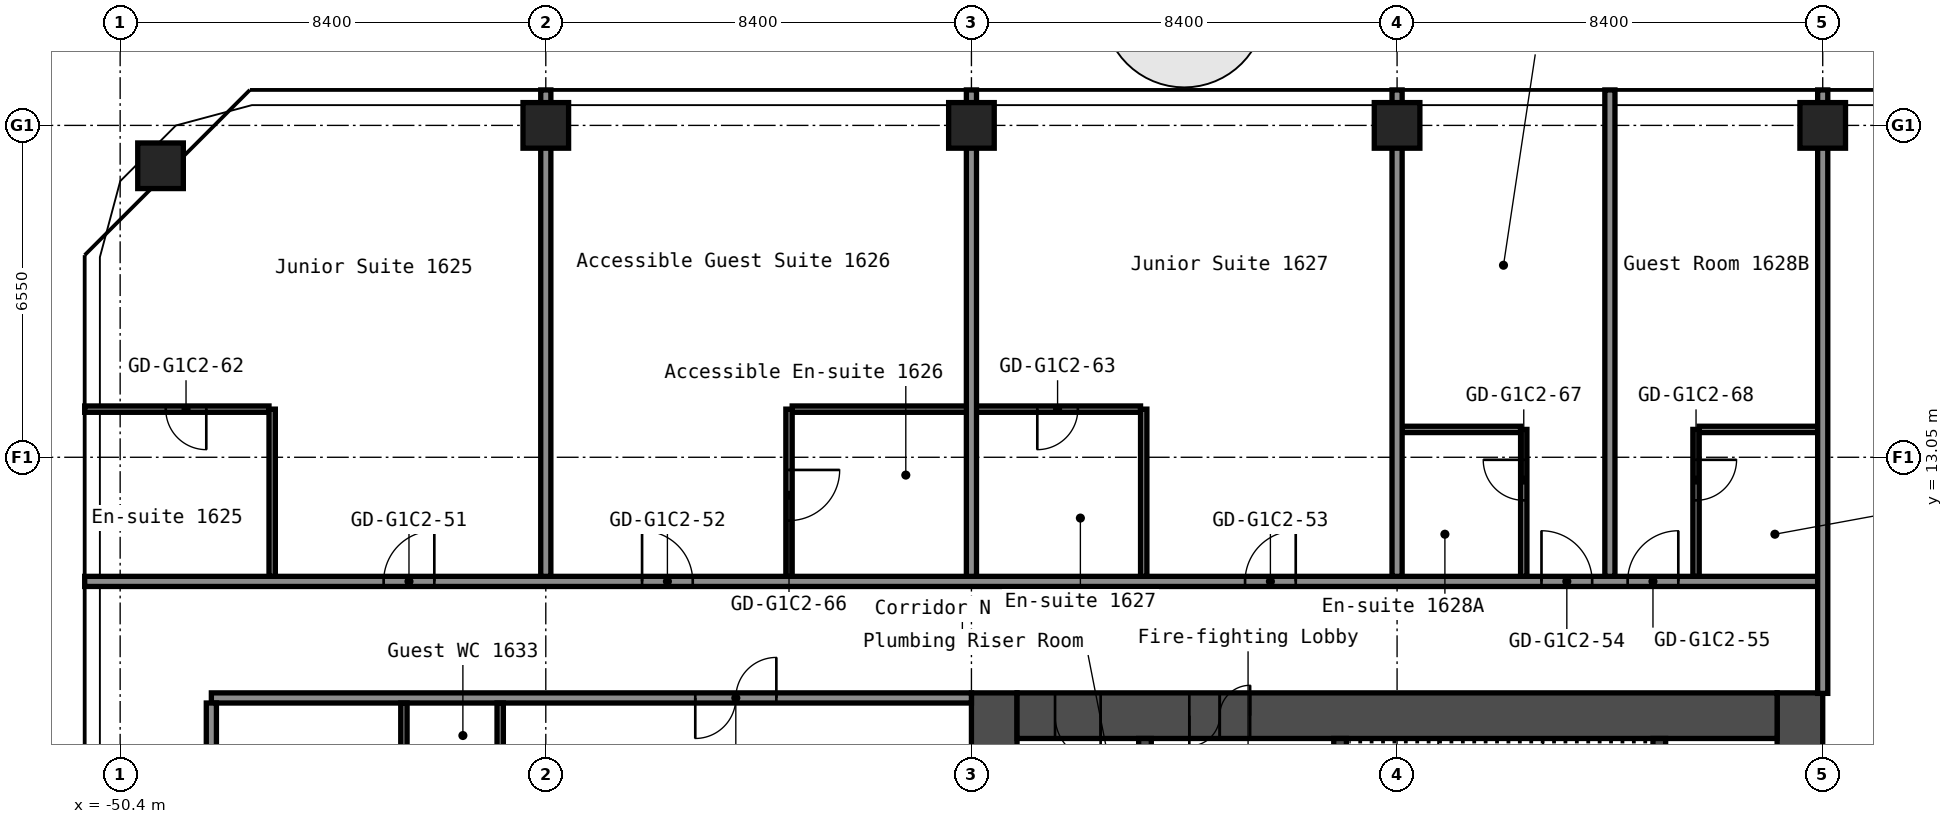
"""IFC4 building model, lengths in metres.
Left out: names, types, materials, properties, quantities, classifications, styles, units other than length and angle.
Written with IfcOpenShell. Run it as: python <this file> out.ifc"""

import sys

from ifc_helpers import new_model, si_unit, direction, frame, frame_2d, origin, origin_2d, place, context, subcontext, project, spatial, rectangle, hollow_rectangle, extrude, element, fill, save


model = new_model("IFC4")
c1 = context("Model", 3, precision=1e-05, world=origin(), true_north=direction((0.0, 1.0)))
c2 = subcontext(c1, "Body", "Model", "MODEL_VIEW")
j1 = project(units=[si_unit("LENGTHUNIT", "METRE"), si_unit("PLANEANGLEUNIT", "RADIAN")], contexts=[c1])
p1 = place(None, origin())
s1 = spatial("IfcSite", under=j1, at=p1, CompositionType="ELEMENT")
p2 = place(p1, origin())
s2 = spatial("IfcBuilding", under=s1, at=p2, CompositionType="ELEMENT")
p3 = place(p2, frame((0.0, 0.0, 58.2)))
s3 = spatial("IfcBuildingStorey", under=s2, at=p3, CompositionType="ELEMENT", Elevation=58.2)
for number, where, z_axis, x_axis in (
    (1, (-49.603, 18.803, 0.0), (0.0, 0.0, 1.0), (1.0, 0.0, 0.0)),
    (2, (-42.0, 19.6, 0.0), (0.0, 0.0, 1.0), (1.0, 0.0, 0.0)),
    (3, (-33.6, 19.6, 0.0), (0.0, 0.0, 1.0), (1.0, 0.0, 0.0)),
    (4, (-25.2, 19.6, 0.0), (0.0, 0.0, 1.0), (1.0, 0.0, 0.0)),
    (5, (-16.8, 19.6, 0.0), (0.0, 0.0, 1.0), (1.0, 0.0, 0.0)),
):
    element("IfcColumn", number, at=place(p3, frame(where, z_axis=z_axis, x_axis=x_axis)), inside=s3, PredefinedType="COLUMN", context=c2, shape_type="SweptSolid", body=[
        extrude(hollow_rectangle(XDim=0.9, YDim=0.9, WallThickness=0.036, at=origin_2d()), origin(), (0.0, 0.0, 1.0), 2.8),
    ])
p4 = place(p3, frame((-17.25, -8.4, 0.0), z_axis=(0.0, 0.0, 1.0), x_axis=(0.0, 1.0, 0.0)))
e6 = element("IfcWall", 6, at=p4, inside=s3, PredefinedType="SHEAR", context=c2, shape_type="SweptSolid", body=[
    extrude(rectangle(XDim=16.8, YDim=0.9, at=frame_2d((8.4, 0.0))), origin(), (0.0, 0.0, 1.0), 2.8),
])
p5 = place(p4, frame((12.75, 0.0, 0.0)))
e7 = element("IfcOpeningElement", 7, at=p5, cuts=e6, PredefinedType="OPENING", context=c2, shape_type="SweptSolid", body=[
    extrude(rectangle(XDim=1.2, YDim=2.1, at=frame_2d((0.6, 1.05))), frame((0.0, 0.46, 0.0), z_axis=(0.0, -1.0, 0.0), x_axis=(1.0, 0.0, 0.0)), (0.0, 0.0, 1.0), 0.92),
])
p6 = place(p4, frame((2.85, 0.0, 0.0)))
e8 = element("IfcOpeningElement", 8, at=p6, cuts=e6, PredefinedType="OPENING", context=c2, shape_type="SweptSolid", body=[
    extrude(rectangle(XDim=1.2, YDim=2.1, at=frame_2d((0.6, 1.05))), frame((0.0, 0.46, 0.0), z_axis=(0.0, -1.0, 0.0), x_axis=(1.0, 0.0, 0.0)), (0.0, 0.0, 1.0), 0.92),
])
p7 = place(p3, frame((-33.15, -8.4, 0.0), z_axis=(0.0, 0.0, 1.0), x_axis=(0.0, 1.0, 0.0)))
e9 = element("IfcWall", 9, at=p7, inside=s3, PredefinedType="SHEAR", context=c2, shape_type="SweptSolid", body=[
    extrude(rectangle(XDim=16.8, YDim=0.9, at=frame_2d((8.4, 0.0))), origin(), (0.0, 0.0, 1.0), 2.8),
])
p8 = place(p3, frame((-32.7, 7.95, 0.0), z_axis=(0.0, 0.0, 1.0), x_axis=(1.0, 0.0, 0.0)))
e10 = element("IfcWall", 10, at=p8, inside=s3, PredefinedType="SHEAR", context=c2, shape_type="SweptSolid", body=[
    extrude(rectangle(XDim=15.0, YDim=0.9, at=frame_2d((7.5, 0.0))), origin(), (0.0, 0.0, 1.0), 2.8),
])
p9 = place(p8, frame((3.4, 0.0, 0.0)))
e11 = element("IfcOpeningElement", 11, at=p9, cuts=e10, PredefinedType="OPENING", context=c2, shape_type="SweptSolid", body=[
    extrude(rectangle(XDim=1.2, YDim=2.1, at=frame_2d((0.6, 1.05))), frame((0.0, 0.46, 0.0), z_axis=(0.0, -1.0, 0.0), x_axis=(1.0, 0.0, 0.0)), (0.0, 0.0, 1.0), 0.92),
])
p10 = place(p8, frame((0.75, 0.0, 0.0)))
e12 = element("IfcOpeningElement", 12, at=p10, cuts=e10, PredefinedType="OPENING", context=c2, shape_type="SweptSolid", body=[
    extrude(rectangle(XDim=0.9, YDim=2.1, at=frame_2d((0.45, 1.05))), frame((0.0, 0.46, 0.0), z_axis=(0.0, -1.0, 0.0), x_axis=(1.0, 0.0, 0.0)), (0.0, 0.0, 1.0), 0.92),
])
p11 = place(p3, frame((-20.025, 1.2, 0.0), z_axis=(0.0, 0.0, 1.0), x_axis=(0.0, 1.0, 0.0)))
e13 = element("IfcWall", 13, at=p11, inside=s3, PredefinedType="SHEAR", context=c2, shape_type="SweptSolid", body=[
    extrude(rectangle(XDim=6.3, YDim=0.25, at=frame_2d((3.15, 0.0))), origin(), (0.0, 0.0, 1.0), 2.8),
])
p12 = place(p3, frame((-26.325, 3.75, 0.0), z_axis=(0.0, 0.0, 1.0), x_axis=(0.0, 1.0, 0.0)))
e14 = element("IfcWall", 14, at=p12, inside=s3, PredefinedType="SHEAR", context=c2, shape_type="SweptSolid", body=[
    extrude(rectangle(XDim=3.75, YDim=0.25, at=frame_2d((1.875, 0.0))), origin(), (0.0, 0.0, 1.0), 2.8),
])
p13 = place(p12, frame((1.25, 0.0, 0.0)))
e15 = element("IfcOpeningElement", 15, at=p13, cuts=e14, PredefinedType="OPENING", context=c2, shape_type="SweptSolid", body=[
    extrude(rectangle(XDim=1.2, YDim=2.1, at=frame_2d((0.6, 1.05))), frame((0.0, 0.135, 0.0), z_axis=(0.0, -1.0, 0.0), x_axis=(1.0, 0.0, 0.0)), (0.0, 0.0, 1.0), 0.27),
])
p14 = place(p3, frame((-30.175, 1.45, 0.0), z_axis=(0.0, 0.0, 1.0), x_axis=(0.0, 1.0, 0.0)))
e16 = element("IfcWall", 16, at=p14, inside=s3, PredefinedType="SHEAR", context=c2, shape_type="SweptSolid", body=[
    extrude(rectangle(XDim=6.05, YDim=0.25, at=frame_2d((3.025, 0.0))), origin(), (0.0, 0.0, 1.0), 2.8),
])
p15 = place(p14, frame((2.625, 0.0, 0.0)))
e17 = element("IfcOpeningElement", 17, at=p15, cuts=e16, PredefinedType="OPENING", context=c2, shape_type="SweptSolid", body=[
    extrude(rectangle(XDim=1.1, YDim=2.1, at=frame_2d((0.55, 1.05))), frame((0.0, 0.135, 0.0), z_axis=(0.0, -1.0, 0.0), x_axis=(1.0, 0.0, 0.0)), (0.0, 0.0, 1.0), 0.27),
])
p16 = place(p3, frame((-48.6, 8.3, 0.0), z_axis=(0.0, 0.0, 1.0), x_axis=(1.0, 0.0, 0.0)))
e18 = element("IfcWall", 18, at=p16, inside=s3, PredefinedType="PARTITIONING", context=c2, shape_type="SweptSolid", body=[
    extrude(rectangle(XDim=15.0, YDim=0.2, at=frame_2d((7.5, 0.0))), origin(), (0.0, 0.0, 1.0), 2.8),
])
p17 = place(p16, frame((9.55, 0.0, 0.0)))
e19 = element("IfcOpeningElement", 19, at=p17, cuts=e18, PredefinedType="OPENING", context=c2, shape_type="SweptSolid", body=[
    extrude(rectangle(XDim=1.6, YDim=2.1, at=frame_2d((0.8, 1.05))), frame((0.0, 0.11, 0.0), z_axis=(0.0, -1.0, 0.0), x_axis=(1.0, 0.0, 0.0)), (0.0, 0.0, 1.0), 0.22),
])
p18 = place(p3, frame((-51.1, 10.6, 0.0), z_axis=(0.0, 0.0, 1.0), x_axis=(1.0, 0.0, 0.0)))
e20 = element("IfcWall", 20, at=p18, inside=s3, PredefinedType="PARTITIONING", context=c2, shape_type="SweptSolid", body=[
    extrude(rectangle(XDim=34.3, YDim=0.2, at=frame_2d((17.15, 0.0))), origin(), (0.0, 0.0, 1.0), 2.8),
])
p19 = place(p18, frame((5.9, 0.0, 0.0)))
e21 = element("IfcOpeningElement", 21, at=p19, cuts=e20, PredefinedType="OPENING", context=c2, shape_type="SweptSolid", body=[
    extrude(rectangle(XDim=1.0, YDim=2.1, at=frame_2d((0.5, 1.05))), frame((0.0, 0.11, 0.0), z_axis=(0.0, -1.0, 0.0), x_axis=(1.0, 0.0, 0.0)), (0.0, 0.0, 1.0), 0.22),
])
p20 = place(p18, frame((11.0, 0.0, 0.0)))
e22 = element("IfcOpeningElement", 22, at=p20, cuts=e20, PredefinedType="OPENING", context=c2, shape_type="SweptSolid", body=[
    extrude(rectangle(XDim=1.0, YDim=2.1, at=frame_2d((0.5, 1.05))), frame((0.0, 0.11, 0.0), z_axis=(0.0, -1.0, 0.0), x_axis=(1.0, 0.0, 0.0)), (0.0, 0.0, 1.0), 0.22),
])
p21 = place(p18, frame((22.9, 0.0, 0.0)))
e23 = element("IfcOpeningElement", 23, at=p21, cuts=e20, PredefinedType="OPENING", context=c2, shape_type="SweptSolid", body=[
    extrude(rectangle(XDim=1.0, YDim=2.1, at=frame_2d((0.5, 1.05))), frame((0.0, 0.11, 0.0), z_axis=(0.0, -1.0, 0.0), x_axis=(1.0, 0.0, 0.0)), (0.0, 0.0, 1.0), 0.22),
])
p22 = place(p18, frame((28.75, 0.0, 0.0)))
e24 = element("IfcOpeningElement", 24, at=p22, cuts=e20, PredefinedType="OPENING", context=c2, shape_type="SweptSolid", body=[
    extrude(rectangle(XDim=1.0, YDim=2.1, at=frame_2d((0.5, 1.05))), frame((0.0, 0.11, 0.0), z_axis=(0.0, -1.0, 0.0), x_axis=(1.0, 0.0, 0.0)), (0.0, 0.0, 1.0), 0.22),
])
p23 = place(p18, frame((30.45, 0.0, 0.0)))
e25 = element("IfcOpeningElement", 25, at=p23, cuts=e20, PredefinedType="OPENING", context=c2, shape_type="SweptSolid", body=[
    extrude(rectangle(XDim=1.0, YDim=2.1, at=frame_2d((0.5, 1.05))), frame((0.0, 0.11, 0.0), z_axis=(0.0, -1.0, 0.0), x_axis=(1.0, 0.0, 0.0)), (0.0, 0.0, 1.0), 0.22),
])
for number, where, z_axis, x_axis in (
    (26, (-25.1, 13.6, 0.0), (0.0, 0.0, 1.0), (1.0, 0.0, 0.0)),
    (27, (-19.238, 13.6, 0.0), (0.0, 0.0, 1.0), (1.0, 0.0, 0.0)),
):
    element("IfcWall", number, at=place(p3, frame(where, z_axis=z_axis, x_axis=x_axis)), inside=s3, PredefinedType="PARTITIONING", context=c2, shape_type="SweptSolid", body=[
        extrude(rectangle(XDim=2.338, YDim=0.125, at=frame_2d((1.169, 0.0))), origin(), (0.0, 0.0, 1.0), 2.8),
    ])
p24 = place(p3, frame((-51.1, 14.0, 0.0), z_axis=(0.0, 0.0, 1.0), x_axis=(1.0, 0.0, 0.0)))
e28 = element("IfcWall", 28, at=p24, inside=s3, PredefinedType="PARTITIONING", context=c2, shape_type="SweptSolid", body=[
    extrude(rectangle(XDim=3.638, YDim=0.125, at=frame_2d((1.819, 0.0))), origin(), (0.0, 0.0, 1.0), 2.8),
])
p25 = place(p24, frame((1.6, 0.0, 0.0)))
e29 = element("IfcOpeningElement", 29, at=p25, cuts=e28, PredefinedType="OPENING", context=c2, shape_type="SweptSolid", body=[
    extrude(rectangle(XDim=0.8, YDim=2.1, at=frame_2d((0.4, 1.05))), frame((0.0, 0.073, 0.0), z_axis=(0.0, -1.0, 0.0), x_axis=(1.0, 0.0, 0.0)), (0.0, 0.0, 1.0), 0.145),
])
p26 = place(p3, frame((-37.137, 14.0, 0.0), z_axis=(0.0, 0.0, 1.0), x_axis=(1.0, 0.0, 0.0)))
e30 = element("IfcWall", 30, at=p26, inside=s3, PredefinedType="PARTITIONING", context=c2, shape_type="SweptSolid", body=[
    extrude(rectangle(XDim=6.875, YDim=0.125, at=frame_2d((3.438, 0.0))), origin(), (0.0, 0.0, 1.0), 2.8),
])
p27 = place(p26, frame((4.837, 0.0, 0.0)))
e31 = element("IfcOpeningElement", 31, at=p27, cuts=e30, PredefinedType="OPENING", context=c2, shape_type="SweptSolid", body=[
    extrude(rectangle(XDim=0.8, YDim=2.1, at=frame_2d((0.4, 1.05))), frame((0.0, 0.073, 0.0), z_axis=(0.0, -1.0, 0.0), x_axis=(1.0, 0.0, 0.0)), (0.0, 0.0, 1.0), 0.145),
])
p28 = place(p3, frame((-48.6, -8.2, 0.0), z_axis=(0.0, 0.0, 1.0), x_axis=(0.0, 1.0, 0.0)))
e32 = element("IfcWall", 32, at=p28, inside=s3, PredefinedType="PARTITIONING", context=c2, shape_type="SweptSolid", body=[
    extrude(rectangle(XDim=16.4, YDim=0.2, at=frame_2d((8.2, 0.0))), origin(), (0.0, 0.0, 1.0), 2.8),
])
for number, where, z_axis, x_axis in (
    (33, (-47.4, 10.7, 0.0), (0.0, 0.0, 1.0), (0.0, 1.0, 0.0)),
    (34, (-44.8, 4.9, 0.0), (0.0, 0.0, 1.0), (0.0, 1.0, 0.0)),
):
    element("IfcWall", number, at=place(p3, frame(where, z_axis=z_axis, x_axis=x_axis)), inside=s3, PredefinedType="PARTITIONING", context=c2, shape_type="SweptSolid", body=[
        extrude(rectangle(XDim=3.3, YDim=0.125, at=frame_2d((1.65, 0.0))), origin(), (0.0, 0.0, 1.0), 2.8),
    ])
p29 = place(p3, frame((-42.9, 5.9, 0.0), z_axis=(0.0, 0.0, 1.0), x_axis=(0.0, 1.0, 0.0)))
e35 = element("IfcWall", 35, at=p29, inside=s3, PredefinedType="PARTITIONING", context=c2, shape_type="SweptSolid", body=[
    extrude(rectangle(XDim=2.3, YDim=0.125, at=frame_2d((1.15, 0.0))), origin(), (0.0, 0.0, 1.0), 2.8),
])
p30 = place(p3, frame((-42.0, 10.7, 0.0), z_axis=(0.0, 0.0, 1.0), x_axis=(0.0, 1.0, 0.0)))
e36 = element("IfcWall", 36, at=p30, inside=s3, PredefinedType="PARTITIONING", context=c2, shape_type="SweptSolid", body=[
    extrude(rectangle(XDim=9.6, YDim=0.2, at=frame_2d((4.8, 0.0))), origin(), (0.0, 0.0, 1.0), 2.8),
])
p31 = place(p3, frame((-37.2, 10.7, 0.0), z_axis=(0.0, 0.0, 1.0), x_axis=(0.0, 1.0, 0.0)))
e37 = element("IfcWall", 37, at=p31, inside=s3, PredefinedType="PARTITIONING", context=c2, shape_type="SweptSolid", body=[
    extrude(rectangle(XDim=3.3, YDim=0.125, at=frame_2d((1.65, 0.0))), origin(), (0.0, 0.0, 1.0), 2.8),
])
p32 = place(p31, frame((1.1, 0.0, 0.0)))
e38 = element("IfcOpeningElement", 38, at=p32, cuts=e37, PredefinedType="OPENING", context=c2, shape_type="SweptSolid", body=[
    extrude(rectangle(XDim=1.0, YDim=2.1, at=frame_2d((0.5, 1.05))), frame((0.0, 0.073, 0.0), z_axis=(0.0, -1.0, 0.0), x_axis=(1.0, 0.0, 0.0)), (0.0, 0.0, 1.0), 0.145),
])
p33 = place(p3, frame((-33.6, 10.7, 0.0), z_axis=(0.0, 0.0, 1.0), x_axis=(0.0, 1.0, 0.0)))
e39 = element("IfcWall", 39, at=p33, inside=s3, PredefinedType="PARTITIONING", context=c2, shape_type="SweptSolid", body=[
    extrude(rectangle(XDim=9.6, YDim=0.2, at=frame_2d((4.8, 0.0))), origin(), (0.0, 0.0, 1.0), 2.8),
])
p34 = place(p3, frame((-30.2, 10.7, 0.0), z_axis=(0.0, 0.0, 1.0), x_axis=(0.0, 1.0, 0.0)))
e40 = element("IfcWall", 40, at=p34, inside=s3, PredefinedType="PARTITIONING", context=c2, shape_type="SweptSolid", body=[
    extrude(rectangle(XDim=3.3, YDim=0.125, at=frame_2d((1.65, 0.0))), origin(), (0.0, 0.0, 1.0), 2.8),
])
p35 = place(p3, frame((-25.2, 10.7, 0.0), z_axis=(0.0, 0.0, 1.0), x_axis=(0.0, 1.0, 0.0)))
e41 = element("IfcWall", 41, at=p35, inside=s3, PredefinedType="PARTITIONING", context=c2, shape_type="SweptSolid", body=[
    extrude(rectangle(XDim=9.6, YDim=0.2, at=frame_2d((4.8, 0.0))), origin(), (0.0, 0.0, 1.0), 2.8),
])
p36 = place(p3, frame((-22.7, 10.7, 0.0), z_axis=(0.0, 0.0, 1.0), x_axis=(0.0, 1.0, 0.0)))
e42 = element("IfcWall", 42, at=p36, inside=s3, PredefinedType="PARTITIONING", context=c2, shape_type="SweptSolid", body=[
    extrude(rectangle(XDim=2.9, YDim=0.125, at=frame_2d((1.45, 0.0))), origin(), (0.0, 0.0, 1.0), 2.8),
])
p37 = place(p36, frame((1.5, 0.0, 0.0)))
e43 = element("IfcOpeningElement", 43, at=p37, cuts=e42, PredefinedType="OPENING", context=c2, shape_type="SweptSolid", body=[
    extrude(rectangle(XDim=0.8, YDim=2.1, at=frame_2d((0.4, 1.05))), frame((0.0, 0.073, 0.0), z_axis=(0.0, -1.0, 0.0), x_axis=(1.0, 0.0, 0.0)), (0.0, 0.0, 1.0), 0.145),
])
p38 = place(p3, frame((-21.0, 10.7, 0.0), z_axis=(0.0, 0.0, 1.0), x_axis=(0.0, 1.0, 0.0)))
e44 = element("IfcWall", 44, at=p38, inside=s3, PredefinedType="PARTITIONING", context=c2, shape_type="SweptSolid", body=[
    extrude(rectangle(XDim=9.6, YDim=0.2, at=frame_2d((4.8, 0.0))), origin(), (0.0, 0.0, 1.0), 2.8),
])
p39 = place(p3, frame((-19.3, 10.7, 0.0), z_axis=(0.0, 0.0, 1.0), x_axis=(0.0, 1.0, 0.0)))
e45 = element("IfcWall", 45, at=p39, inside=s3, PredefinedType="PARTITIONING", context=c2, shape_type="SweptSolid", body=[
    extrude(rectangle(XDim=2.9, YDim=0.125, at=frame_2d((1.45, 0.0))), origin(), (0.0, 0.0, 1.0), 2.8),
])
p40 = place(p39, frame((1.5, 0.0, 0.0)))
e46 = element("IfcOpeningElement", 46, at=p40, cuts=e45, PredefinedType="OPENING", context=c2, shape_type="SweptSolid", body=[
    extrude(rectangle(XDim=0.8, YDim=2.1, at=frame_2d((0.4, 1.05))), frame((0.0, 0.073, 0.0), z_axis=(0.0, -1.0, 0.0), x_axis=(1.0, 0.0, 0.0)), (0.0, 0.0, 1.0), 0.145),
])
p41 = place(p3, frame((-16.8, 8.39, 0.0), z_axis=(0.0, 0.0, 1.0), x_axis=(0.0, 1.0, 0.0)))
e47 = element("IfcWall", 47, at=p41, inside=s3, PredefinedType="PARTITIONING", context=c2, shape_type="SweptSolid", body=[
    extrude(rectangle(XDim=11.91, YDim=0.2, at=frame_2d((5.955, 0.0))), origin(), (0.0, 0.0, 1.0), 2.8),
])
p42 = place(p9, origin())
e48 = element("IfcDoor", 48, at=p42, inside=s3, OperationType="DOUBLE_DOOR_SINGLE_SWING", PredefinedType="DOOR", context=c2, shape_type="SweptSolid", body=[
    extrude(rectangle(XDim=1.2, YDim=2.1, at=frame_2d((0.6, 1.05))), frame((0.0, 0.025, 0.0), z_axis=(0.0, -1.0, 0.0), x_axis=(1.0, 0.0, 0.0)), (0.0, 0.0, 1.0), 0.05),
])
fill(e11, e48)
p43 = place(p10, origin())
e49 = element("IfcDoor", 49, at=p43, inside=s3, OperationType="SINGLE_SWING_RIGHT", PredefinedType="DOOR", context=c2, shape_type="SweptSolid", body=[
    extrude(rectangle(XDim=0.9, YDim=2.1, at=frame_2d((0.45, 1.05))), frame((0.0, 0.025, 0.0), z_axis=(0.0, -1.0, 0.0), x_axis=(1.0, 0.0, 0.0)), (0.0, 0.0, 1.0), 0.05),
])
fill(e12, e49)
p44 = place(p17, origin())
e50 = element("IfcDoor", 50, at=p44, inside=s3, OperationType="DOUBLE_DOOR_SINGLE_SWING", PredefinedType="DOOR", context=c2, shape_type="SweptSolid", body=[
    extrude(rectangle(XDim=1.6, YDim=2.1, at=frame_2d((0.8, 1.05))), frame((0.0, 0.025, 0.0), z_axis=(0.0, -1.0, 0.0), x_axis=(1.0, 0.0, 0.0)), (0.0, 0.0, 1.0), 0.05),
])
fill(e19, e50)
p45 = place(p19, origin())
e51 = element("IfcDoor", 51, at=p45, inside=s3, OperationType="SINGLE_SWING_LEFT", PredefinedType="DOOR", context=c2, shape_type="SweptSolid", body=[
    extrude(rectangle(XDim=1.0, YDim=2.1, at=frame_2d((0.5, 1.05))), frame((0.0, 0.025, 0.0), z_axis=(0.0, -1.0, 0.0), x_axis=(1.0, 0.0, 0.0)), (0.0, 0.0, 1.0), 0.05),
])
fill(e21, e51)
p46 = place(p20, origin())
e52 = element("IfcDoor", 52, at=p46, inside=s3, OperationType="SINGLE_SWING_RIGHT", PredefinedType="DOOR", context=c2, shape_type="SweptSolid", body=[
    extrude(rectangle(XDim=1.0, YDim=2.1, at=frame_2d((0.5, 1.05))), frame((0.0, 0.025, 0.0), z_axis=(0.0, -1.0, 0.0), x_axis=(1.0, 0.0, 0.0)), (0.0, 0.0, 1.0), 0.05),
])
fill(e22, e52)
p47 = place(p21, origin())
e53 = element("IfcDoor", 53, at=p47, inside=s3, OperationType="SINGLE_SWING_LEFT", PredefinedType="DOOR", context=c2, shape_type="SweptSolid", body=[
    extrude(rectangle(XDim=1.0, YDim=2.1, at=frame_2d((0.5, 1.05))), frame((0.0, 0.025, 0.0), z_axis=(0.0, -1.0, 0.0), x_axis=(1.0, 0.0, 0.0)), (0.0, 0.0, 1.0), 0.05),
])
fill(e23, e53)
p48 = place(p22, origin())
e54 = element("IfcDoor", 54, at=p48, inside=s3, OperationType="SINGLE_SWING_RIGHT", PredefinedType="DOOR", context=c2, shape_type="SweptSolid", body=[
    extrude(rectangle(XDim=1.0, YDim=2.1, at=frame_2d((0.5, 1.05))), frame((0.0, 0.025, 0.0), z_axis=(0.0, -1.0, 0.0), x_axis=(1.0, 0.0, 0.0)), (0.0, 0.0, 1.0), 0.05),
])
fill(e24, e54)
p49 = place(p23, origin())
e55 = element("IfcDoor", 55, at=p49, inside=s3, OperationType="SINGLE_SWING_LEFT", PredefinedType="DOOR", context=c2, shape_type="SweptSolid", body=[
    extrude(rectangle(XDim=1.0, YDim=2.1, at=frame_2d((0.5, 1.05))), frame((0.0, 0.025, 0.0), z_axis=(0.0, -1.0, 0.0), x_axis=(1.0, 0.0, 0.0)), (0.0, 0.0, 1.0), 0.05),
])
fill(e25, e55)
p50 = place(p25, origin())
e56 = element("IfcDoor", 56, at=p50, inside=s3, OperationType="SINGLE_SWING_RIGHT", PredefinedType="DOOR", context=c2, shape_type="SweptSolid", body=[
    extrude(rectangle(XDim=0.8, YDim=2.1, at=frame_2d((0.4, 1.05))), frame((0.0, 0.025, 0.0), z_axis=(0.0, -1.0, 0.0), x_axis=(1.0, 0.0, 0.0)), (0.0, 0.0, 1.0), 0.05),
])
fill(e29, e56)
p51 = place(p27, origin())
e57 = element("IfcDoor", 57, at=p51, inside=s3, OperationType="SINGLE_SWING_LEFT", PredefinedType="DOOR", context=c2, shape_type="SweptSolid", body=[
    extrude(rectangle(XDim=0.8, YDim=2.1, at=frame_2d((0.4, 1.05))), frame((0.0, 0.025, 0.0), z_axis=(0.0, -1.0, 0.0), x_axis=(1.0, 0.0, 0.0)), (0.0, 0.0, 1.0), 0.05),
])
fill(e31, e57)
p52 = place(p32, origin())
e58 = element("IfcDoor", 58, at=p52, inside=s3, OperationType="SINGLE_SWING_RIGHT", PredefinedType="DOOR", context=c2, shape_type="SweptSolid", body=[
    extrude(rectangle(XDim=1.0, YDim=2.1, at=frame_2d((0.5, 1.05))), frame((0.0, 0.025, 0.0), z_axis=(0.0, -1.0, 0.0), x_axis=(1.0, 0.0, 0.0)), (0.0, 0.0, 1.0), 0.05),
])
fill(e38, e58)
p53 = place(p37, origin())
e59 = element("IfcDoor", 59, at=p53, inside=s3, OperationType="SINGLE_SWING_LEFT", PredefinedType="DOOR", context=c2, shape_type="SweptSolid", body=[
    extrude(rectangle(XDim=0.8, YDim=2.1, at=frame_2d((0.4, 1.05))), frame((0.0, 0.025, 0.0), z_axis=(0.0, -1.0, 0.0), x_axis=(1.0, 0.0, 0.0)), (0.0, 0.0, 1.0), 0.05),
])
fill(e43, e59)
p54 = place(p40, origin())
e60 = element("IfcDoor", 60, at=p54, inside=s3, OperationType="SINGLE_SWING_RIGHT", PredefinedType="DOOR", context=c2, shape_type="SweptSolid", body=[
    extrude(rectangle(XDim=0.8, YDim=2.1, at=frame_2d((0.4, 1.05))), frame((0.0, 0.025, 0.0), z_axis=(0.0, -1.0, 0.0), x_axis=(1.0, 0.0, 0.0)), (0.0, 0.0, 1.0), 0.05),
])
fill(e46, e60)
save(model, sys.argv[1])
